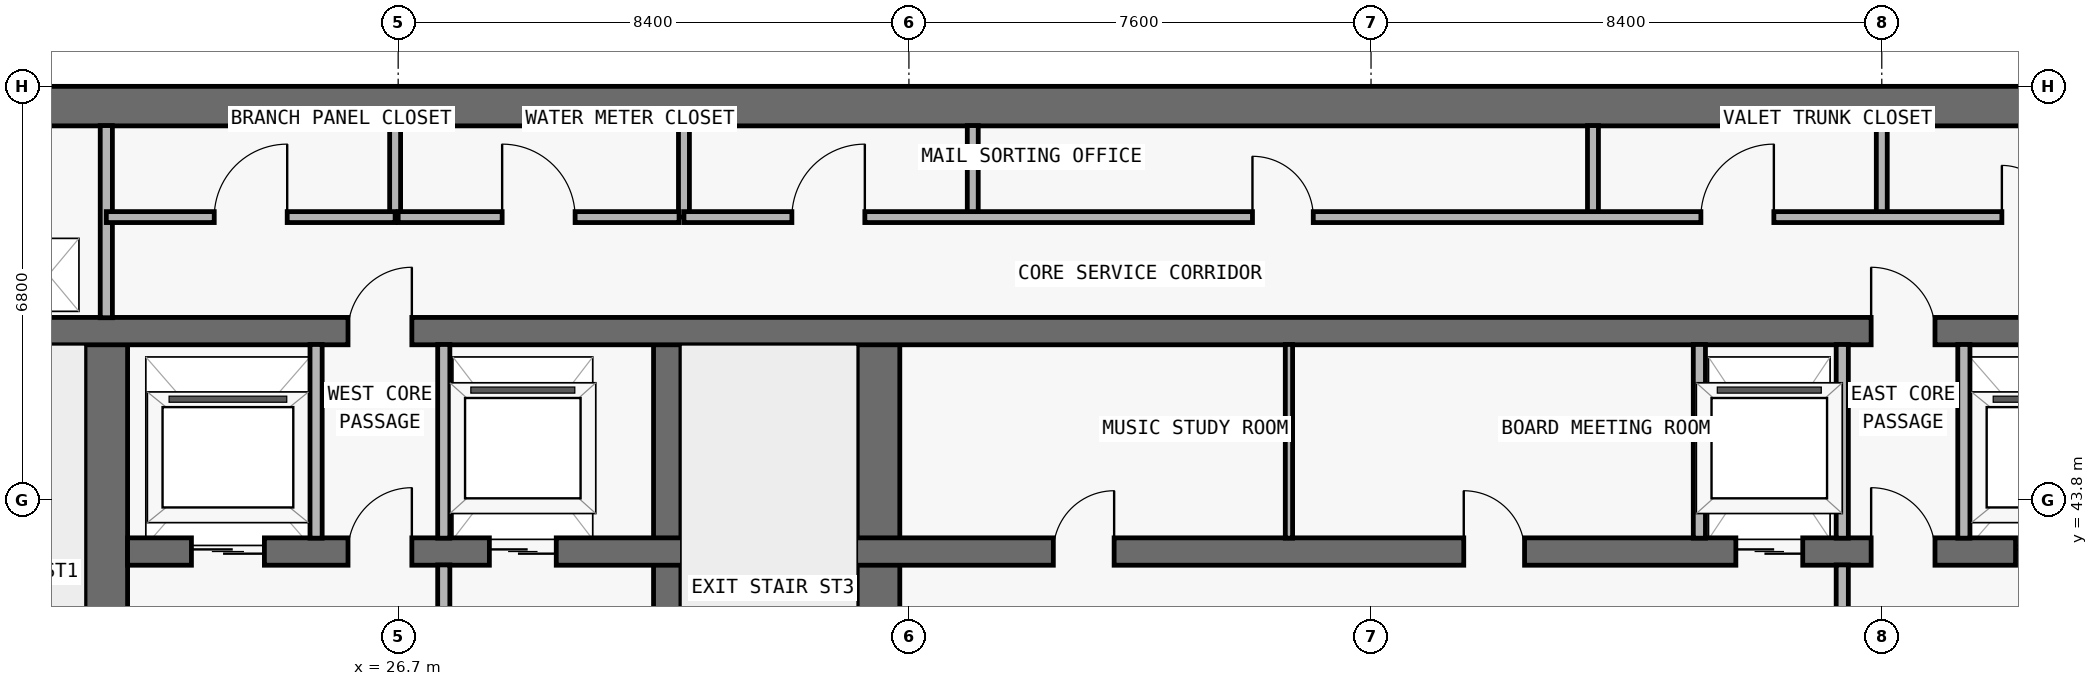
"""IFC4 building model, lengths in metres.
Left out: names, types, materials, properties, quantities, classifications, styles, units other than length and angle.
Written with IfcOpenShell. Run it as: python <this file> out.ifc"""

import sys

from ifc_helpers import new_model, si_unit, direction, frame, frame_2d, origin, place, context, subcontext, project, spatial, rectangle, extrude, element, fill, save


model = new_model("IFC4")
c1 = context("Model", 3, precision=1e-05, world=origin(), true_north=direction((0.0, 1.0)))
c2 = subcontext(c1, "Body", "Model", "MODEL_VIEW")
j1 = project(units=[si_unit("LENGTHUNIT", "METRE"), si_unit("PLANEANGLEUNIT", "RADIAN")], contexts=[c1])
p1 = place(None, origin())
s1 = spatial("IfcSite", under=j1, at=p1, CompositionType="ELEMENT")
p2 = place(p1, origin())
s2 = spatial("IfcBuilding", under=s1, at=p2, CompositionType="ELEMENT")
p3 = place(p2, frame((0.0, 0.0, 188.4)))
s3 = spatial("IfcBuildingStorey", under=s2, at=p3, CompositionType="ELEMENT", Elevation=188.4)
p4 = place(p3, frame((17.95, 50.275, 0.0), z_axis=(0.0, 0.0, 1.0), x_axis=(1.0, 0.0, 0.0)))
e1 = element("IfcWall", 1, at=p4, inside=s3, PredefinedType="SHEAR", context=c2, shape_type="SweptSolid", body=[
    extrude(rectangle(XDim=41.9, YDim=0.65, at=frame_2d((20.95, 0.0))), origin(), (0.0, 0.0, 1.0), 3.05),
])
p5 = place(p3, frame((21.9, 37.0, 0.0), z_axis=(0.0, 0.0, 1.0), x_axis=(0.0, 1.0, 0.0)))
e2 = element("IfcWall", 2, at=p5, inside=s3, PredefinedType="SHEAR", context=c2, shape_type="SweptSolid", body=[
    extrude(rectangle(XDim=9.575, YDim=0.7, at=frame_2d((4.788, 0.0))), origin(), (0.0, 0.0, 1.0), 3.05),
])
p6 = place(p5, frame((0.55, 0.0, 0.0)))
e3 = element("IfcOpeningElement", 3, at=p6, cuts=e2, PredefinedType="OPENING", context=c2, shape_type="SweptSolid", body=[
    extrude(rectangle(XDim=1.1, YDim=2.15, at=frame_2d((0.55, 1.075))), frame((0.0, 0.36, 0.0), z_axis=(0.0, -1.0, 0.0), x_axis=(1.0, 0.0, 0.0)), (0.0, 0.0, 1.0), 0.72),
])
p7 = place(p3, frame((31.125, 37.0, 0.0), z_axis=(0.0, 0.0, 1.0), x_axis=(0.0, 1.0, 0.0)))
e4 = element("IfcWall", 4, at=p7, inside=s3, PredefinedType="SHEAR", context=c2, shape_type="SweptSolid", body=[
    extrude(rectangle(XDim=9.575, YDim=0.45, at=frame_2d((4.788, 0.0))), origin(), (0.0, 0.0, 1.0), 3.05),
])
p8 = place(p3, frame((34.6, 37.0, 0.0), z_axis=(0.0, 0.0, 1.0), x_axis=(0.0, 1.0, 0.0)))
e5 = element("IfcWall", 5, at=p8, inside=s3, PredefinedType="SHEAR", context=c2, shape_type="SweptSolid", body=[
    extrude(rectangle(XDim=9.575, YDim=0.7, at=frame_2d((4.788, 0.0))), origin(), (0.0, 0.0, 1.0), 3.05),
])
p9 = place(p3, frame((22.25, 42.95, 0.0), z_axis=(0.0, 0.0, 1.0), x_axis=(1.0, 0.0, 0.0)))
e6 = element("IfcWall", 6, at=p9, inside=s3, PredefinedType="SHEAR", context=c2, shape_type="SweptSolid", body=[
    extrude(rectangle(XDim=33.3, YDim=0.45, at=frame_2d((16.65, 0.0))), origin(), (0.0, 0.0, 1.0), 3.05),
])
p10 = place(p9, frame((1.05, 0.0, 0.0)))
e7 = element("IfcOpeningElement", 7, at=p10, cuts=e6, PredefinedType="OPENING", context=c2, shape_type="SweptSolid", body=[
    extrude(rectangle(XDim=1.2, YDim=2.2, at=frame_2d((0.6, 1.1))), frame((0.0, 0.235, 0.0), z_axis=(0.0, -1.0, 0.0), x_axis=(1.0, 0.0, 0.0)), (0.0, 0.0, 1.0), 0.47),
])
p11 = place(p9, frame((31.05, 0.0, 0.0)))
e8 = element("IfcOpeningElement", 8, at=p11, cuts=e6, PredefinedType="OPENING", context=c2, shape_type="SweptSolid", body=[
    extrude(rectangle(XDim=1.2, YDim=2.2, at=frame_2d((0.6, 1.1))), frame((0.0, 0.235, 0.0), z_axis=(0.0, -1.0, 0.0), x_axis=(1.0, 0.0, 0.0)), (0.0, 0.0, 1.0), 0.47),
])
p12 = place(p9, frame((26.45, 0.0, 0.0)))
e9 = element("IfcOpeningElement", 9, at=p12, cuts=e6, PredefinedType="OPENING", context=c2, shape_type="SweptSolid", body=[
    extrude(rectangle(XDim=1.1, YDim=2.2, at=frame_2d((0.55, 1.1))), frame((0.0, 0.235, 0.0), z_axis=(0.0, -1.0, 0.0), x_axis=(1.0, 0.0, 0.0)), (0.0, 0.0, 1.0), 0.47),
])
p13 = place(p9, frame((5.95, 0.0, 0.0)))
e10 = element("IfcOpeningElement", 10, at=p13, cuts=e6, PredefinedType="OPENING", context=c2, shape_type="SweptSolid", body=[
    extrude(rectangle(XDim=1.1, YDim=2.2, at=frame_2d((0.55, 1.1))), frame((0.0, 0.235, 0.0), z_axis=(0.0, -1.0, 0.0), x_axis=(1.0, 0.0, 0.0)), (0.0, 0.0, 1.0), 0.47),
])
p14 = place(p9, frame((3.625, 0.0, 0.0)))
e11 = element("IfcOpeningElement", 11, at=p14, cuts=e6, PredefinedType="OPENING", context=c2, shape_type="SweptSolid", body=[
    extrude(rectangle(XDim=1.05, YDim=2.15, at=frame_2d((0.525, 1.075))), frame((0.0, 0.235, 0.0), z_axis=(0.0, -1.0, 0.0), x_axis=(1.0, 0.0, 0.0)), (0.0, 0.0, 1.0), 0.47),
])
p15 = place(p9, frame((28.675, 0.0, 0.0)))
e12 = element("IfcOpeningElement", 12, at=p15, cuts=e6, PredefinedType="OPENING", context=c2, shape_type="SweptSolid", body=[
    extrude(rectangle(XDim=1.05, YDim=2.15, at=frame_2d((0.525, 1.075))), frame((0.0, 0.235, 0.0), z_axis=(0.0, -1.0, 0.0), x_axis=(1.0, 0.0, 0.0)), (0.0, 0.0, 1.0), 0.47),
])
p16 = place(p9, frame((15.225, 0.0, 0.0)))
e13 = element("IfcOpeningElement", 13, at=p16, cuts=e6, PredefinedType="OPENING", context=c2, shape_type="SweptSolid", body=[
    extrude(rectangle(XDim=1.0, YDim=2.2, at=frame_2d((0.5, 1.1))), frame((0.0, 0.235, 0.0), z_axis=(0.0, -1.0, 0.0), x_axis=(1.0, 0.0, 0.0)), (0.0, 0.0, 1.0), 0.47),
])
p17 = place(p9, frame((21.975, 0.0, 0.0)))
e14 = element("IfcOpeningElement", 14, at=p17, cuts=e6, PredefinedType="OPENING", context=c2, shape_type="SweptSolid", body=[
    extrude(rectangle(XDim=1.0, YDim=2.2, at=frame_2d((0.5, 1.1))), frame((0.0, 0.235, 0.0), z_axis=(0.0, -1.0, 0.0), x_axis=(1.0, 0.0, 0.0)), (0.0, 0.0, 1.0), 0.47),
])
p18 = place(p3, frame((18.3, 46.575, 0.0), z_axis=(0.0, 0.0, 1.0), x_axis=(1.0, 0.0, 0.0)))
e15 = element("IfcWall", 15, at=p18, inside=s3, PredefinedType="SHEAR", context=c2, shape_type="SweptSolid", body=[
    extrude(rectangle(XDim=41.2, YDim=0.45, at=frame_2d((20.6, 0.0))), origin(), (0.0, 0.0, 1.0), 3.05),
])
p19 = place(p18, frame((7.575, 0.0, 0.0)))
e16 = element("IfcOpeningElement", 16, at=p19, cuts=e15, PredefinedType="OPENING", context=c2, shape_type="SweptSolid", body=[
    extrude(rectangle(XDim=1.05, YDim=2.15, at=frame_2d((0.525, 1.075))), frame((0.0, 0.235, 0.0), z_axis=(0.0, -1.0, 0.0), x_axis=(1.0, 0.0, 0.0)), (0.0, 0.0, 1.0), 0.47),
])
p20 = place(p18, frame((32.625, 0.0, 0.0)))
e17 = element("IfcOpeningElement", 17, at=p20, cuts=e15, PredefinedType="OPENING", context=c2, shape_type="SweptSolid", body=[
    extrude(rectangle(XDim=1.05, YDim=2.15, at=frame_2d((0.525, 1.075))), frame((0.0, 0.235, 0.0), z_axis=(0.0, -1.0, 0.0), x_axis=(1.0, 0.0, 0.0)), (0.0, 0.0, 1.0), 0.47),
])
p21 = place(p3, frame((21.9, 46.795, 0.0), z_axis=(0.0, 0.0, 1.0), x_axis=(0.0, 1.0, 0.0)))
e18 = element("IfcWall", 18, at=p21, inside=s3, PredefinedType="PARTITIONING", context=c2, shape_type="SweptSolid", body=[
    extrude(rectangle(XDim=3.16, YDim=0.2, at=frame_2d((1.58, 0.0))), origin(), (0.0, 0.0, 1.0), 3.05),
])
p22 = place(p3, frame((25.35, 43.17, 0.0), z_axis=(0.0, 0.0, 1.0), x_axis=(0.0, 1.0, 0.0)))
e19 = element("IfcWall", 19, at=p22, inside=s3, PredefinedType="PARTITIONING", context=c2, shape_type="SweptSolid", body=[
    extrude(rectangle(XDim=3.185, YDim=0.2, at=frame_2d((1.593, 0.0))), origin(), (0.0, 0.0, 1.0), 3.05),
])
p23 = place(p3, frame((26.65, 48.45, 0.0), z_axis=(0.0, 0.0, 1.0), x_axis=(0.0, 1.0, 0.0)))
e20 = element("IfcWall", 20, at=p23, inside=s3, PredefinedType="PARTITIONING", context=c2, shape_type="SweptSolid", body=[
    extrude(rectangle(XDim=1.505, YDim=0.18, at=frame_2d((0.752, 0.0))), origin(), (0.0, 0.0, 1.0), 3.05),
])
p24 = place(p3, frame((27.45, 37.345, 0.0), z_axis=(0.0, 0.0, 1.0), x_axis=(0.0, 1.0, 0.0)))
e21 = element("IfcWall", 21, at=p24, inside=s3, PredefinedType="PARTITIONING", context=c2, shape_type="SweptSolid", body=[
    extrude(rectangle(XDim=5.385, YDim=0.2, at=frame_2d((2.692, 0.0))), origin(), (0.0, 0.0, 1.0), 3.05),
])
p25 = place(p3, frame((27.45, 43.17, 0.0), z_axis=(0.0, 0.0, 1.0), x_axis=(0.0, 1.0, 0.0)))
e22 = element("IfcWall", 22, at=p25, inside=s3, PredefinedType="PARTITIONING", context=c2, shape_type="SweptSolid", body=[
    extrude(rectangle(XDim=3.185, YDim=0.2, at=frame_2d((1.593, 0.0))), origin(), (0.0, 0.0, 1.0), 3.05),
])
for number, where, z_axis, x_axis in (
    (23, (31.4, 48.45, 0.0), (0.0, 0.0, 1.0), (0.0, 1.0, 0.0)),
    (24, (36.15, 48.45, 0.0), (0.0, 0.0, 1.0), (0.0, 1.0, 0.0)),
):
    element("IfcWall", number, at=place(p3, frame(where, z_axis=z_axis, x_axis=x_axis)), inside=s3, PredefinedType="PARTITIONING", context=c2, shape_type="SweptSolid", body=[
        extrude(rectangle(XDim=1.505, YDim=0.18, at=frame_2d((0.752, 0.0))), origin(), (0.0, 0.0, 1.0), 3.05),
    ])
p26 = place(p3, frame((41.35, 43.17, 0.0), z_axis=(0.0, 0.0, 1.0), x_axis=(0.0, 1.0, 0.0)))
e25 = element("IfcWall", 25, at=p26, inside=s3, PredefinedType="PARTITIONING", context=c2, shape_type="SweptSolid", body=[
    extrude(rectangle(XDim=3.185, YDim=0.12, at=frame_2d((1.593, 0.0))), origin(), (0.0, 0.0, 1.0), 3.05),
])
p27 = place(p3, frame((46.35, 48.45, 0.0), z_axis=(0.0, 0.0, 1.0), x_axis=(0.0, 1.0, 0.0)))
e26 = element("IfcWall", 26, at=p27, inside=s3, PredefinedType="PARTITIONING", context=c2, shape_type="SweptSolid", body=[
    extrude(rectangle(XDim=1.505, YDim=0.18, at=frame_2d((0.752, 0.0))), origin(), (0.0, 0.0, 1.0), 3.05),
])
p28 = place(p3, frame((48.1, 43.17, 0.0), z_axis=(0.0, 0.0, 1.0), x_axis=(0.0, 1.0, 0.0)))
e27 = element("IfcWall", 27, at=p28, inside=s3, PredefinedType="PARTITIONING", context=c2, shape_type="SweptSolid", body=[
    extrude(rectangle(XDim=3.185, YDim=0.2, at=frame_2d((1.593, 0.0))), origin(), (0.0, 0.0, 1.0), 3.05),
])
p29 = place(p3, frame((50.45, 37.345, 0.0), z_axis=(0.0, 0.0, 1.0), x_axis=(0.0, 1.0, 0.0)))
e28 = element("IfcWall", 28, at=p29, inside=s3, PredefinedType="PARTITIONING", context=c2, shape_type="SweptSolid", body=[
    extrude(rectangle(XDim=5.385, YDim=0.2, at=frame_2d((2.692, 0.0))), origin(), (0.0, 0.0, 1.0), 3.05),
])
p30 = place(p3, frame((50.45, 43.17, 0.0), z_axis=(0.0, 0.0, 1.0), x_axis=(0.0, 1.0, 0.0)))
e29 = element("IfcWall", 29, at=p30, inside=s3, PredefinedType="PARTITIONING", context=c2, shape_type="SweptSolid", body=[
    extrude(rectangle(XDim=3.185, YDim=0.2, at=frame_2d((1.593, 0.0))), origin(), (0.0, 0.0, 1.0), 3.05),
])
p31 = place(p3, frame((51.1, 48.45, 0.0), z_axis=(0.0, 0.0, 1.0), x_axis=(0.0, 1.0, 0.0)))
e30 = element("IfcWall", 30, at=p31, inside=s3, PredefinedType="PARTITIONING", context=c2, shape_type="SweptSolid", body=[
    extrude(rectangle(XDim=1.505, YDim=0.18, at=frame_2d((0.752, 0.0))), origin(), (0.0, 0.0, 1.0), 3.05),
])
p32 = place(p3, frame((52.45, 43.17, 0.0), z_axis=(0.0, 0.0, 1.0), x_axis=(0.0, 1.0, 0.0)))
e31 = element("IfcWall", 31, at=p32, inside=s3, PredefinedType="PARTITIONING", context=c2, shape_type="SweptSolid", body=[
    extrude(rectangle(XDim=3.185, YDim=0.2, at=frame_2d((1.593, 0.0))), origin(), (0.0, 0.0, 1.0), 3.05),
])
p33 = place(p3, frame((21.9, 48.45, 0.0), z_axis=(0.0, 0.0, 1.0), x_axis=(1.0, 0.0, 0.0)))
e32 = element("IfcWall", 32, at=p33, inside=s3, PredefinedType="PARTITIONING", context=c2, shape_type="SweptSolid", body=[
    extrude(rectangle(XDim=4.75, YDim=0.18, at=frame_2d((2.375, 0.0))), origin(), (0.0, 0.0, 1.0), 3.05),
])
p34 = place(p33, frame((1.775, 0.0, 0.0)))
e33 = element("IfcOpeningElement", 33, at=p34, cuts=e32, PredefinedType="OPENING", context=c2, shape_type="SweptSolid", body=[
    extrude(rectangle(XDim=1.2, YDim=2.2, at=frame_2d((0.6, 1.1))), frame((0.0, 0.1, 0.0), z_axis=(0.0, -1.0, 0.0), x_axis=(1.0, 0.0, 0.0)), (0.0, 0.0, 1.0), 0.2),
])
p35 = place(p3, frame((26.7, 48.45, 0.0), z_axis=(0.0, 0.0, 1.0), x_axis=(1.0, 0.0, 0.0)))
e34 = element("IfcWall", 34, at=p35, inside=s3, PredefinedType="PARTITIONING", context=c2, shape_type="SweptSolid", body=[
    extrude(rectangle(XDim=4.62, YDim=0.18, at=frame_2d((2.31, 0.0))), origin(), (0.0, 0.0, 1.0), 3.05),
])
p36 = place(p35, frame((1.71, 0.0, 0.0)))
e35 = element("IfcOpeningElement", 35, at=p36, cuts=e34, PredefinedType="OPENING", context=c2, shape_type="SweptSolid", body=[
    extrude(rectangle(XDim=1.2, YDim=2.2, at=frame_2d((0.6, 1.1))), frame((0.0, 0.1, 0.0), z_axis=(0.0, -1.0, 0.0), x_axis=(1.0, 0.0, 0.0)), (0.0, 0.0, 1.0), 0.2),
])
p37 = place(p3, frame((31.4, 48.45, 0.0), z_axis=(0.0, 0.0, 1.0), x_axis=(1.0, 0.0, 0.0)))
e36 = element("IfcWall", 36, at=p37, inside=s3, PredefinedType="PARTITIONING", context=c2, shape_type="SweptSolid", body=[
    extrude(rectangle(XDim=24.5, YDim=0.18, at=frame_2d((12.25, 0.0))), origin(), (0.0, 0.0, 1.0), 3.05),
])
p38 = place(p37, frame((1.775, 0.0, 0.0)))
e37 = element("IfcOpeningElement", 37, at=p38, cuts=e36, PredefinedType="OPENING", context=c2, shape_type="SweptSolid", body=[
    extrude(rectangle(XDim=1.2, YDim=2.2, at=frame_2d((0.6, 1.1))), frame((0.0, 0.1, 0.0), z_axis=(0.0, -1.0, 0.0), x_axis=(1.0, 0.0, 0.0)), (0.0, 0.0, 1.0), 0.2),
])
p39 = place(p37, frame((9.35, 0.0, 0.0)))
e38 = element("IfcOpeningElement", 38, at=p39, cuts=e36, PredefinedType="OPENING", context=c2, shape_type="SweptSolid", body=[
    extrude(rectangle(XDim=1.0, YDim=2.2, at=frame_2d((0.5, 1.1))), frame((0.0, 0.1, 0.0), z_axis=(0.0, -1.0, 0.0), x_axis=(1.0, 0.0, 0.0)), (0.0, 0.0, 1.0), 0.2),
])
p40 = place(p37, frame((16.725, 0.0, 0.0)))
e39 = element("IfcOpeningElement", 39, at=p40, cuts=e36, PredefinedType="OPENING", context=c2, shape_type="SweptSolid", body=[
    extrude(rectangle(XDim=1.2, YDim=2.2, at=frame_2d((0.6, 1.1))), frame((0.0, 0.1, 0.0), z_axis=(0.0, -1.0, 0.0), x_axis=(1.0, 0.0, 0.0)), (0.0, 0.0, 1.0), 0.2),
])
p41 = place(p37, frame((21.675, 0.0, 0.0)))
e40 = element("IfcOpeningElement", 40, at=p41, cuts=e36, PredefinedType="OPENING", context=c2, shape_type="SweptSolid", body=[
    extrude(rectangle(XDim=0.85, YDim=2.1, at=frame_2d((0.425, 1.05))), frame((0.0, 0.1, 0.0), z_axis=(0.0, -1.0, 0.0), x_axis=(1.0, 0.0, 0.0)), (0.0, 0.0, 1.0), 0.2),
])
p42 = place(p10, origin())
e41 = element("IfcDoor", 41, at=p42, inside=s3, OperationType="DOUBLE_DOOR_SLIDING", PredefinedType="DOOR", context=c2, shape_type="SweptSolid", body=[
    extrude(rectangle(XDim=1.2, YDim=2.2, at=frame_2d((0.6, 1.1))), frame((0.0, 0.025, 0.0), z_axis=(0.0, -1.0, 0.0), x_axis=(1.0, 0.0, 0.0)), (0.0, 0.0, 1.0), 0.05),
])
fill(e7, e41)
p43 = place(p11, origin())
e42 = element("IfcDoor", 42, at=p43, inside=s3, OperationType="DOUBLE_DOOR_SLIDING", PredefinedType="DOOR", context=c2, shape_type="SweptSolid", body=[
    extrude(rectangle(XDim=1.2, YDim=2.2, at=frame_2d((0.6, 1.1))), frame((0.0, 0.025, 0.0), z_axis=(0.0, -1.0, 0.0), x_axis=(1.0, 0.0, 0.0)), (0.0, 0.0, 1.0), 0.05),
])
fill(e8, e42)
p44 = place(p12, origin())
e43 = element("IfcDoor", 43, at=p44, inside=s3, OperationType="DOUBLE_DOOR_SLIDING", PredefinedType="DOOR", context=c2, shape_type="SweptSolid", body=[
    extrude(rectangle(XDim=1.1, YDim=2.2, at=frame_2d((0.55, 1.1))), frame((0.0, 0.025, 0.0), z_axis=(0.0, -1.0, 0.0), x_axis=(1.0, 0.0, 0.0)), (0.0, 0.0, 1.0), 0.05),
])
fill(e9, e43)
p45 = place(p13, origin())
e44 = element("IfcDoor", 44, at=p45, inside=s3, OperationType="DOUBLE_DOOR_SLIDING", PredefinedType="DOOR", context=c2, shape_type="SweptSolid", body=[
    extrude(rectangle(XDim=1.1, YDim=2.2, at=frame_2d((0.55, 1.1))), frame((0.0, 0.025, 0.0), z_axis=(0.0, -1.0, 0.0), x_axis=(1.0, 0.0, 0.0)), (0.0, 0.0, 1.0), 0.05),
])
fill(e10, e44)
p46 = place(p14, origin())
e45 = element("IfcDoor", 45, at=p46, inside=s3, OperationType="SINGLE_SWING_RIGHT", PredefinedType="DOOR", context=c2, shape_type="SweptSolid", body=[
    extrude(rectangle(XDim=1.05, YDim=2.15, at=frame_2d((0.525, 1.075))), frame((0.0, 0.025, 0.0), z_axis=(0.0, -1.0, 0.0), x_axis=(1.0, 0.0, 0.0)), (0.0, 0.0, 1.0), 0.05),
])
fill(e11, e45)
p47 = place(p15, origin())
e46 = element("IfcDoor", 46, at=p47, inside=s3, OperationType="SINGLE_SWING_LEFT", PredefinedType="DOOR", context=c2, shape_type="SweptSolid", body=[
    extrude(rectangle(XDim=1.05, YDim=2.15, at=frame_2d((0.525, 1.075))), frame((0.0, 0.025, 0.0), z_axis=(0.0, -1.0, 0.0), x_axis=(1.0, 0.0, 0.0)), (0.0, 0.0, 1.0), 0.05),
])
fill(e12, e46)
p48 = place(p16, origin())
e47 = element("IfcDoor", 47, at=p48, inside=s3, OperationType="SINGLE_SWING_RIGHT", PredefinedType="DOOR", context=c2, shape_type="SweptSolid", body=[
    extrude(rectangle(XDim=1.0, YDim=2.2, at=frame_2d((0.5, 1.1))), frame((0.0, 0.025, 0.0), z_axis=(0.0, -1.0, 0.0), x_axis=(1.0, 0.0, 0.0)), (0.0, 0.0, 1.0), 0.05),
])
fill(e13, e47)
p49 = place(p17, origin())
e48 = element("IfcDoor", 48, at=p49, inside=s3, OperationType="SINGLE_SWING_LEFT", PredefinedType="DOOR", context=c2, shape_type="SweptSolid", body=[
    extrude(rectangle(XDim=1.0, YDim=2.2, at=frame_2d((0.5, 1.1))), frame((0.0, 0.025, 0.0), z_axis=(0.0, -1.0, 0.0), x_axis=(1.0, 0.0, 0.0)), (0.0, 0.0, 1.0), 0.05),
])
fill(e14, e48)
p50 = place(p19, origin())
e49 = element("IfcDoor", 49, at=p50, inside=s3, OperationType="SINGLE_SWING_RIGHT", PredefinedType="DOOR", context=c2, shape_type="SweptSolid", body=[
    extrude(rectangle(XDim=1.05, YDim=2.15, at=frame_2d((0.525, 1.075))), frame((0.0, 0.025, 0.0), z_axis=(0.0, -1.0, 0.0), x_axis=(1.0, 0.0, 0.0)), (0.0, 0.0, 1.0), 0.05),
])
fill(e16, e49)
p51 = place(p20, origin())
e50 = element("IfcDoor", 50, at=p51, inside=s3, OperationType="SINGLE_SWING_LEFT", PredefinedType="DOOR", context=c2, shape_type="SweptSolid", body=[
    extrude(rectangle(XDim=1.05, YDim=2.15, at=frame_2d((0.525, 1.075))), frame((0.0, 0.025, 0.0), z_axis=(0.0, -1.0, 0.0), x_axis=(1.0, 0.0, 0.0)), (0.0, 0.0, 1.0), 0.05),
])
fill(e17, e50)
p52 = place(p34, origin())
e51 = element("IfcDoor", 51, at=p52, inside=s3, OperationType="SINGLE_SWING_RIGHT", PredefinedType="DOOR", context=c2, shape_type="SweptSolid", body=[
    extrude(rectangle(XDim=1.2, YDim=2.2, at=frame_2d((0.6, 1.1))), frame((0.0, 0.025, 0.0), z_axis=(0.0, -1.0, 0.0), x_axis=(1.0, 0.0, 0.0)), (0.0, 0.0, 1.0), 0.05),
])
fill(e33, e51)
p53 = place(p36, origin())
e52 = element("IfcDoor", 52, at=p53, inside=s3, OperationType="SINGLE_SWING_LEFT", PredefinedType="DOOR", context=c2, shape_type="SweptSolid", body=[
    extrude(rectangle(XDim=1.2, YDim=2.2, at=frame_2d((0.6, 1.1))), frame((0.0, 0.025, 0.0), z_axis=(0.0, -1.0, 0.0), x_axis=(1.0, 0.0, 0.0)), (0.0, 0.0, 1.0), 0.05),
])
fill(e35, e52)
p54 = place(p38, origin())
e53 = element("IfcDoor", 53, at=p54, inside=s3, OperationType="SINGLE_SWING_RIGHT", PredefinedType="DOOR", context=c2, shape_type="SweptSolid", body=[
    extrude(rectangle(XDim=1.2, YDim=2.2, at=frame_2d((0.6, 1.1))), frame((0.0, 0.025, 0.0), z_axis=(0.0, -1.0, 0.0), x_axis=(1.0, 0.0, 0.0)), (0.0, 0.0, 1.0), 0.05),
])
fill(e37, e53)
p55 = place(p39, origin())
e54 = element("IfcDoor", 54, at=p55, inside=s3, OperationType="SINGLE_SWING_LEFT", PredefinedType="DOOR", context=c2, shape_type="SweptSolid", body=[
    extrude(rectangle(XDim=1.0, YDim=2.2, at=frame_2d((0.5, 1.1))), frame((0.0, 0.025, 0.0), z_axis=(0.0, -1.0, 0.0), x_axis=(1.0, 0.0, 0.0)), (0.0, 0.0, 1.0), 0.05),
])
fill(e38, e54)
p56 = place(p40, origin())
e55 = element("IfcDoor", 55, at=p56, inside=s3, OperationType="SINGLE_SWING_RIGHT", PredefinedType="DOOR", context=c2, shape_type="SweptSolid", body=[
    extrude(rectangle(XDim=1.2, YDim=2.2, at=frame_2d((0.6, 1.1))), frame((0.0, 0.025, 0.0), z_axis=(0.0, -1.0, 0.0), x_axis=(1.0, 0.0, 0.0)), (0.0, 0.0, 1.0), 0.05),
])
fill(e39, e55)
p57 = place(p41, origin())
e56 = element("IfcDoor", 56, at=p57, inside=s3, OperationType="SINGLE_SWING_LEFT", PredefinedType="DOOR", context=c2, shape_type="SweptSolid", body=[
    extrude(rectangle(XDim=0.85, YDim=2.1, at=frame_2d((0.425, 1.05))), frame((0.0, 0.025, 0.0), z_axis=(0.0, -1.0, 0.0), x_axis=(1.0, 0.0, 0.0)), (0.0, 0.0, 1.0), 0.05),
])
fill(e40, e56)
save(model, sys.argv[1])
